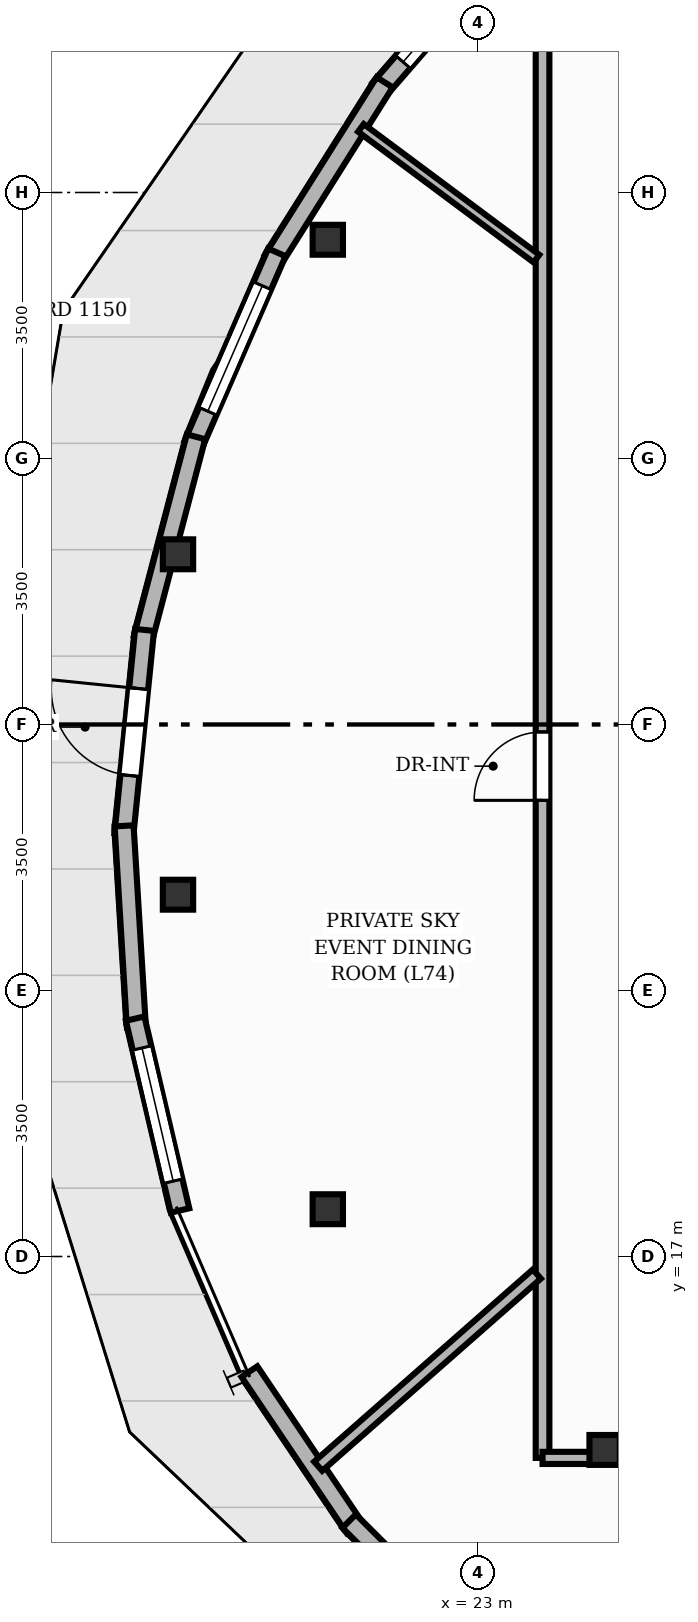
"""IFC4 building model, lengths in metres.
Left out: names, types, materials, properties, quantities, classifications, styles, units other than length and angle.
Written with IfcOpenShell. Run it as: python <this file> out.ifc"""

import sys

from ifc_helpers import new_model, si_unit, direction, frame, frame_2d, origin, origin_2d, place, context, subcontext, project, spatial, rectangle, i_section, extrude, element, fill, save


model = new_model("IFC4")
c1 = context("Model", 3, precision=1e-05, world=origin(), true_north=direction((0.0, 1.0)))
c2 = subcontext(c1, "Body", "Model", "MODEL_VIEW")
j1 = project(units=[si_unit("LENGTHUNIT", "METRE"), si_unit("PLANEANGLEUNIT", "RADIAN")], contexts=[c1])
p1 = place(None, origin())
s1 = spatial("IfcSite", under=j1, at=p1, CompositionType="ELEMENT")
p2 = place(p1, origin())
s2 = spatial("IfcBuilding", under=s1, at=p2, CompositionType="ELEMENT")
p3 = place(p2, frame((0.0, 0.0, 246.88)))
s3 = spatial("IfcBuildingStorey", under=s2, at=p3, CompositionType="ELEMENT", Elevation=246.88)
for number, where, z_axis, x_axis in (
    (1, (21.025, 30.378, 0.0), (0.0, 0.0, 1.0), (1.0, 0.0, 0.0)),
    (2, (19.054, 26.24, 0.0), (0.0, 0.0, 1.0), (1.0, 0.0, 0.0)),
    (3, (19.054, 21.76, 0.0), (0.0, 0.0, 1.0), (1.0, 0.0, 0.0)),
    (4, (21.025, 17.622, 0.0), (0.0, 0.0, 1.0), (1.0, 0.0, 0.0)),
    (5, (24.667, 14.455, 0.0), (0.0, 0.0, 1.0), (1.0, 0.0, 0.0)),
):
    element("IfcColumn", number, at=place(p3, frame(where, z_axis=z_axis, x_axis=x_axis)), inside=s3, PredefinedType="COLUMN", context=c2, shape_type="SweptSolid", body=[
        extrude(i_section(OverallWidth=0.399, OverallDepth=0.394, WebThickness=0.023, FlangeThickness=0.037, at=origin_2d()), origin(), (0.0, 0.0, 1.0), 4.16),
    ])
p4 = place(p3, frame((21.708, 32.363, 0.0), z_axis=(0.0, 0.0, 1.0), x_axis=(0.655463265554, 0.755227056924, 0.0)))
e6 = element("IfcWall", 6, at=p4, inside=s3, PredefinedType="SOLIDWALL", context=c2, shape_type="SweptSolid", body=[
    extrude(rectangle(XDim=2.738, YDim=0.25, at=frame_2d((1.369, 0.0))), origin(), (0.0, 0.0, 1.0), 3.84),
])
p5 = place(p4, frame((0.469, 0.0, 0.85)))
e7 = element("IfcOpeningElement", 7, at=p5, cuts=e6, PredefinedType="OPENING", context=c2, shape_type="SweptSolid", body=[
    extrude(rectangle(XDim=1.8, YDim=2.0, at=frame_2d((0.9, 1.0))), frame((0.0, 0.135, 0.0), z_axis=(0.0, -1.0, 0.0), x_axis=(1.0, 0.0, 0.0)), (0.0, 0.0, 1.0), 0.27),
])
p6 = place(p3, frame((20.303, 30.116, 0.0), z_axis=(0.0, 0.0, 1.0), x_axis=(0.532693532032, 0.846308218636, 0.0)))
e8 = element("IfcWall", 8, at=p6, inside=s3, PredefinedType="SOLIDWALL", context=c2, shape_type="SweptSolid", body=[
    extrude(rectangle(XDim=2.758, YDim=0.25, at=frame_2d((1.379, 0.0))), origin(), (0.0, 0.0, 1.0), 3.84),
])
p7 = place(p3, frame((19.255, 27.683, 0.0), z_axis=(0.0, 0.0, 1.0), x_axis=(0.398625762511, 0.917113679683, 0.0)))
e9 = element("IfcWall", 9, at=p7, inside=s3, PredefinedType="SOLIDWALL", context=c2, shape_type="SweptSolid", body=[
    extrude(rectangle(XDim=2.758, YDim=0.25, at=frame_2d((1.379, 0.0))), origin(), (0.0, 0.0, 1.0), 3.84),
])
p8 = place(p7, frame((0.479, 0.0, 0.85)))
e10 = element("IfcOpeningElement", 10, at=p8, cuts=e9, PredefinedType="OPENING", context=c2, shape_type="SweptSolid", body=[
    extrude(rectangle(XDim=1.8, YDim=2.0, at=frame_2d((0.9, 1.0))), frame((0.0, 0.135, 0.0), z_axis=(0.0, -1.0, 0.0), x_axis=(1.0, 0.0, 0.0)), (0.0, 0.0, 1.0), 0.27),
])
p9 = place(p3, frame((18.594, 25.137, 0.0), z_axis=(0.0, 0.0, 1.0), x_axis=(0.254159789005, 0.967162241639, 0.0)))
e11 = element("IfcWall", 11, at=p9, inside=s3, PredefinedType="SOLIDWALL", context=c2, shape_type="SweptSolid", body=[
    extrude(rectangle(XDim=2.739, YDim=0.25, at=frame_2d((1.369, 0.0))), origin(), (0.0, 0.0, 1.0), 2.907),
])
p10 = place(p3, frame((18.342, 22.556, 0.0), z_axis=(0.0, 0.0, 1.0), x_axis=(0.100577316095, 0.994929245468, 0.0)))
e12 = element("IfcWall", 12, at=p10, inside=s3, PredefinedType="SOLIDWALL", context=c2, shape_type="SweptSolid", body=[
    extrude(rectangle(XDim=2.702, YDim=0.25, at=frame_2d((1.351, 0.0))), origin(), (0.0, 0.0, 1.0), 3.84),
])
p11 = place(p10, frame((0.776, 0.0, 0.0)))
e13 = element("IfcOpeningElement", 13, at=p11, cuts=e12, PredefinedType="OPENING", context=c2, shape_type="SweptSolid", body=[
    extrude(rectangle(XDim=1.15, YDim=2.2, at=frame_2d((0.575, 1.1))), frame((0.0, 0.135, 0.0), z_axis=(0.0, -1.0, 0.0), x_axis=(1.0, 0.0, 0.0)), (0.0, 0.0, 1.0), 0.27),
])
p12 = place(p3, frame((18.506, 20.02, 0.0), z_axis=(0.0, 0.0, 1.0), x_axis=(-0.060967752852, 0.998139736266, 0.0)))
e14 = element("IfcWall", 14, at=p12, inside=s3, PredefinedType="SOLIDWALL", context=c2, shape_type="SweptSolid", body=[
    extrude(rectangle(XDim=2.651, YDim=0.25, at=frame_2d((1.325, 0.0))), origin(), (0.0, 0.0, 1.0), 3.84),
])
p13 = place(p3, frame((19.08, 17.606, 0.0), z_axis=(0.0, 0.0, 1.0), x_axis=(-0.227726783942, 0.973725069964, 0.0)))
e15 = element("IfcWall", 15, at=p13, inside=s3, PredefinedType="SOLIDWALL", context=c2, shape_type="SweptSolid", body=[
    extrude(rectangle(XDim=2.592, YDim=0.25, at=frame_2d((1.296, 0.0))), origin(), (0.0, 0.0, 1.0), 3.84),
])
p14 = place(p13, frame((0.396, 0.0, 0.85)))
e16 = element("IfcOpeningElement", 16, at=p14, cuts=e15, PredefinedType="OPENING", context=c2, shape_type="SweptSolid", body=[
    extrude(rectangle(XDim=1.8, YDim=2.0, at=frame_2d((0.9, 1.0))), frame((0.0, 0.135, 0.0), z_axis=(0.0, -1.0, 0.0), x_axis=(1.0, 0.0, 0.0)), (0.0, 0.0, 1.0), 0.27),
])
p15 = place(p3, frame((21.377, 13.43, 0.0), z_axis=(0.0, 0.0, 1.0), x_axis=(-0.558536746098, 0.829479778691, 0.0)))
e17 = element("IfcWall", 17, at=p15, inside=s3, PredefinedType="SOLIDWALL", context=c2, shape_type="SweptSolid", body=[
    extrude(rectangle(XDim=2.478, YDim=0.25, at=frame_2d((1.239, 0.0))), origin(), (0.0, 0.0, 1.0), 3.84),
])
p16 = place(p3, frame((23.029, 11.796, 0.0), z_axis=(0.0, 0.0, 1.0), x_axis=(-0.707507464916, 0.70670587028, 0.0)))
e18 = element("IfcWall", 18, at=p16, inside=s3, PredefinedType="SOLIDWALL", context=c2, shape_type="SweptSolid", body=[
    extrude(rectangle(XDim=2.437, YDim=0.25, at=frame_2d((1.218, 0.0))), origin(), (0.0, 0.0, 1.0), 3.84),
])
p17 = place(p3, frame((23.85, 14.35, 0.0), z_axis=(0.0, 0.0, 1.0), x_axis=(0.0, 1.0, 0.0)))
e19 = element("IfcWall", 19, at=p17, inside=s3, PredefinedType="PARTITIONING", context=c2, shape_type="SweptSolid", body=[
    extrude(rectangle(XDim=19.3, YDim=0.18, at=frame_2d((9.65, 0.0))), origin(), (0.0, 0.0, 1.0), 3.835),
])
p18 = place(p17, frame((8.652, 0.0, 0.0)))
e20 = element("IfcOpeningElement", 20, at=p18, cuts=e19, PredefinedType="OPENING", context=c2, shape_type="SweptSolid", body=[
    extrude(rectangle(XDim=0.9, YDim=2.1, at=frame_2d((0.45, 1.05))), frame((0.0, 0.1, 0.0), z_axis=(0.0, -1.0, 0.0), x_axis=(1.0, 0.0, 0.0)), (0.0, 0.0, 1.0), 0.2),
])
p19 = place(p3, frame((40.15, 14.35, 0.0), z_axis=(0.0, 0.0, 1.0), x_axis=(-1.0, 0.0, 0.0)))
e21 = element("IfcWall", 21, at=p19, inside=s3, PredefinedType="PLUMBINGWALL", context=c2, shape_type="SweptSolid", body=[
    extrude(rectangle(XDim=16.3, YDim=0.16, at=frame_2d((8.15, 0.0))), origin(), (0.0, 0.0, 1.0), 2.9),
])
p20 = place(p19, frame((8.216, 0.0, 0.0)))
e22 = element("IfcOpeningElement", 22, at=p20, cuts=e21, PredefinedType="OPENING", context=c2, shape_type="SweptSolid", body=[
    extrude(rectangle(XDim=0.9, YDim=2.1, at=frame_2d((0.45, 1.05))), frame((0.0, 0.09, 0.0), z_axis=(0.0, -1.0, 0.0), x_axis=(1.0, 0.0, 0.0)), (0.0, 0.0, 1.0), 0.18),
])
p21 = place(p3, frame((23.77, 30.13, 0.0), z_axis=(0.0, 0.0, 1.0), x_axis=(-0.801989535219, 0.597338082997, 0.0)))
e23 = element("IfcWall", 23, at=p21, inside=s3, PredefinedType="PARTITIONING", context=c2, shape_type="SweptSolid", body=[
    extrude(rectangle(XDim=2.88, YDim=0.125, at=frame_2d((1.44, 0.0))), origin(), (0.0, 0.0, 1.0), 3.835),
])
p22 = place(p3, frame((23.775, 16.769, 0.0), z_axis=(0.0, 0.0, 1.0), x_axis=(-0.751003011948, -0.660298777862, 0.0)))
e24 = element("IfcWall", 24, at=p22, inside=s3, PredefinedType="PLUMBINGWALL", context=c2, shape_type="SweptSolid", body=[
    extrude(rectangle(XDim=3.83, YDim=0.16, at=frame_2d((1.915, 0.0))), origin(), (0.0, 0.0, 1.0), 3.835),
])
p23 = place(p11, origin())
e25 = element("IfcDoor", 25, at=p23, inside=s3, OperationType="SINGLE_SWING_RIGHT", PredefinedType="DOOR", context=c2, shape_type="SweptSolid", body=[
    extrude(rectangle(XDim=1.15, YDim=2.2, at=frame_2d((0.575, 1.1))), frame((0.0, 0.025, 0.0), z_axis=(0.0, -1.0, 0.0), x_axis=(1.0, 0.0, 0.0)), (0.0, 0.0, 1.0), 0.05),
])
fill(e13, e25)
p24 = place(p5, origin())
e26 = element("IfcWindow", 26, at=p24, inside=s3, PartitioningType="SINGLE_PANEL", PredefinedType="WINDOW", context=c2, shape_type="SweptSolid", body=[
    extrude(rectangle(XDim=1.8, YDim=2.0, at=frame_2d((0.9, 1.0))), frame((0.0, 0.03, 0.0), z_axis=(0.0, -1.0, 0.0), x_axis=(1.0, 0.0, 0.0)), (0.0, 0.0, 1.0), 0.06),
])
fill(e7, e26)
p25 = place(p8, origin())
e27 = element("IfcWindow", 27, at=p25, inside=s3, PartitioningType="SINGLE_PANEL", PredefinedType="WINDOW", context=c2, shape_type="SweptSolid", body=[
    extrude(rectangle(XDim=1.8, YDim=2.0, at=frame_2d((0.9, 1.0))), frame((0.0, 0.03, 0.0), z_axis=(0.0, -1.0, 0.0), x_axis=(1.0, 0.0, 0.0)), (0.0, 0.0, 1.0), 0.06),
])
fill(e10, e27)
p26 = place(p14, origin())
e28 = element("IfcWindow", 28, at=p26, inside=s3, PartitioningType="SINGLE_PANEL", PredefinedType="WINDOW", context=c2, shape_type="SweptSolid", body=[
    extrude(rectangle(XDim=1.8, YDim=2.0, at=frame_2d((0.9, 1.0))), frame((0.0, 0.03, 0.0), z_axis=(0.0, -1.0, 0.0), x_axis=(1.0, 0.0, 0.0)), (0.0, 0.0, 1.0), 0.06),
])
fill(e16, e28)
p27 = place(p18, origin())
e29 = element("IfcDoor", 29, at=p27, inside=s3, OperationType="SINGLE_SWING_LEFT", PredefinedType="DOOR", context=c2, shape_type="SweptSolid", body=[
    extrude(rectangle(XDim=0.9, YDim=2.1, at=frame_2d((0.45, 1.05))), frame((0.0, 0.025, 0.0), z_axis=(0.0, -1.0, 0.0), x_axis=(1.0, 0.0, 0.0)), (0.0, 0.0, 1.0), 0.05),
])
fill(e20, e29)
save(model, sys.argv[1])
